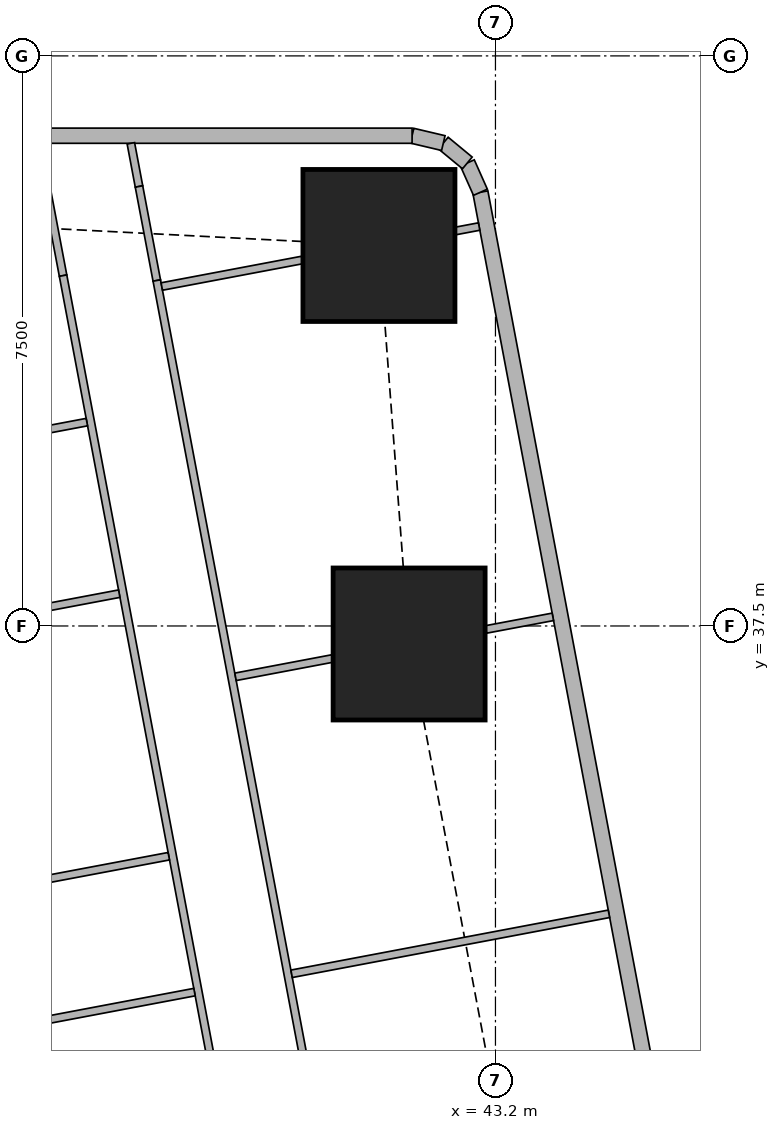
"""IFC4 building model, lengths in metres.
Left out: names, types, materials, properties, quantities, classifications, styles, units other than length and angle.
Written with IfcOpenShell. Run it as: python <this file> out.ifc"""

import sys

from ifc_helpers import new_model, si_unit, direction, frame, frame_2d, origin, origin_2d, place, context, subcontext, project, spatial, rectangle, extrude, element, fill, save


model = new_model("IFC4")
c1 = context("Model", 3, precision=1e-05, world=origin(), true_north=direction((0.0, 1.0)))
c2 = subcontext(c1, "Body", "Model", "MODEL_VIEW")
j1 = project(units=[si_unit("LENGTHUNIT", "METRE"), si_unit("PLANEANGLEUNIT", "RADIAN")], contexts=[c1])
p1 = place(None, origin())
s1 = spatial("IfcSite", under=j1, at=p1, CompositionType="ELEMENT")
p2 = place(p1, origin())
s2 = spatial("IfcBuilding", under=s1, at=p2, CompositionType="ELEMENT")
p3 = place(p2, frame((0.0, 0.0, 262.85)))
s3 = spatial("IfcBuildingStorey", under=s2, at=p3, CompositionType="ELEMENT", Elevation=262.85)
for number, where, z_axis, x_axis in (
    (1, (42.064, 37.263, 0.0), (0.0, 0.0, 1.0), (1.0, 0.0, 0.0)),
    (2, (41.667, 42.506, 0.0), (0.0, 0.0, 1.0), (1.0, 0.0, 0.0)),
):
    element("IfcColumn", number, at=place(p3, frame(where, z_axis=z_axis, x_axis=x_axis)), inside=s3, PredefinedType="COLUMN", context=c2, shape_type="SweptSolid", body=[
        extrude(rectangle(XDim=2.0, YDim=2.0, at=origin_2d()), origin(), (0.0, 0.0, 1.0), 3.75),
    ])
p4 = place(p3, frame((49.684, 7.832, 0.0), z_axis=(0.0, 0.0, 1.0), x_axis=(-0.185616669694, 0.982622232565, 0.0)))
e3 = element("IfcWall", 3, at=p4, inside=s3, PredefinedType="SOLIDWALL", context=c2, shape_type="SweptSolid", body=[
    extrude(rectangle(XDim=36.0, YDim=0.2, at=frame_2d((18.0, 0.0))), origin(), (0.0, 0.0, 1.0), 3.5),
])
p5 = place(p4, frame((2.518, 0.0, 0.9)))
e4 = element("IfcOpeningElement", 4, at=p5, cuts=e3, PredefinedType="OPENING", context=c2, shape_type="SweptSolid", body=[
    extrude(rectangle(XDim=2.4, YDim=1.5, at=frame_2d((1.2, 0.75))), frame((0.0, 0.11, 0.0), z_axis=(0.0, -1.0, 0.0), x_axis=(1.0, 0.0, 0.0)), (0.0, 0.0, 1.0), 0.22),
])
p6 = place(p4, frame((8.444, 0.0, 0.9)))
e5 = element("IfcOpeningElement", 5, at=p6, cuts=e3, PredefinedType="OPENING", context=c2, shape_type="SweptSolid", body=[
    extrude(rectangle(XDim=1.8, YDim=1.5, at=frame_2d((0.9, 0.75))), frame((0.0, 0.11, 0.0), z_axis=(0.0, -1.0, 0.0), x_axis=(1.0, 0.0, 0.0)), (0.0, 0.0, 1.0), 0.22),
])
p7 = place(p4, frame((12.261, 0.0, 0.9)))
e6 = element("IfcOpeningElement", 6, at=p7, cuts=e3, PredefinedType="OPENING", context=c2, shape_type="SweptSolid", body=[
    extrude(rectangle(XDim=1.8, YDim=1.5, at=frame_2d((0.9, 0.75))), frame((0.0, 0.11, 0.0), z_axis=(0.0, -1.0, 0.0), x_axis=(1.0, 0.0, 0.0)), (0.0, 0.0, 1.0), 0.22),
])
p8 = place(p4, frame((16.078, 0.0, 0.9)))
e7 = element("IfcOpeningElement", 7, at=p8, cuts=e3, PredefinedType="OPENING", context=c2, shape_type="SweptSolid", body=[
    extrude(rectangle(XDim=1.8, YDim=1.5, at=frame_2d((0.9, 0.75))), frame((0.0, 0.11, 0.0), z_axis=(0.0, -1.0, 0.0), x_axis=(1.0, 0.0, 0.0)), (0.0, 0.0, 1.0), 0.22),
])
p9 = place(p4, frame((19.894, 0.0, 0.9)))
e8 = element("IfcOpeningElement", 8, at=p9, cuts=e3, PredefinedType="OPENING", context=c2, shape_type="SweptSolid", body=[
    extrude(rectangle(XDim=1.8, YDim=1.5, at=frame_2d((0.9, 0.75))), frame((0.0, 0.11, 0.0), z_axis=(0.0, -1.0, 0.0), x_axis=(1.0, 0.0, 0.0)), (0.0, 0.0, 1.0), 0.22),
])
p10 = place(p4, frame((23.71, 0.0, 0.9)))
e9 = element("IfcOpeningElement", 9, at=p10, cuts=e3, PredefinedType="OPENING", context=c2, shape_type="SweptSolid", body=[
    extrude(rectangle(XDim=1.8, YDim=1.5, at=frame_2d((0.9, 0.75))), frame((0.0, 0.11, 0.0), z_axis=(0.0, -1.0, 0.0), x_axis=(1.0, 0.0, 0.0)), (0.0, 0.0, 1.0), 0.22),
])
p11 = place(p4, frame((27.526, 0.0, 0.9)))
e10 = element("IfcOpeningElement", 10, at=p11, cuts=e3, PredefinedType="OPENING", context=c2, shape_type="SweptSolid", body=[
    extrude(rectangle(XDim=1.8, YDim=1.5, at=frame_2d((0.9, 0.75))), frame((0.0, 0.11, 0.0), z_axis=(0.0, -1.0, 0.0), x_axis=(1.0, 0.0, 0.0)), (0.0, 0.0, 1.0), 0.22),
])
p12 = place(p4, frame((32.046, 0.0, 0.9)))
e11 = element("IfcOpeningElement", 11, at=p12, cuts=e3, PredefinedType="OPENING", context=c2, shape_type="SweptSolid", body=[
    extrude(rectangle(XDim=1.8, YDim=1.5, at=frame_2d((0.9, 0.75))), frame((0.0, 0.11, 0.0), z_axis=(0.0, -1.0, 0.0), x_axis=(1.0, 0.0, 0.0)), (0.0, 0.0, 1.0), 0.22),
])
p13 = place(p3, frame((43.002, 43.206, 0.0), z_axis=(0.0, 0.0, 1.0), x_axis=(-0.40678170573, 0.913525393124, 0.0)))
e12 = element("IfcWall", 12, at=p13, inside=s3, PredefinedType="SOLIDWALL", context=c2, shape_type="SweptSolid", body=[
    extrude(rectangle(XDim=0.423, YDim=0.2, at=frame_2d((0.211, 0.0))), origin(), (0.0, 0.0, 1.0), 3.5),
])
p14 = place(p3, frame((42.83, 43.592, 0.0), z_axis=(0.0, 0.0, 1.0), x_axis=(-0.771190539797, 0.636604391539, 0.0)))
e13 = element("IfcWall", 13, at=p14, inside=s3, PredefinedType="SOLIDWALL", context=c2, shape_type="SweptSolid", body=[
    extrude(rectangle(XDim=0.41, YDim=0.2, at=frame_2d((0.205, 0.0))), origin(), (0.0, 0.0, 1.0), 3.5),
])
p15 = place(p3, frame((42.514, 43.853, 0.0), z_axis=(0.0, 0.0, 1.0), x_axis=(-0.973288080424, 0.229587265555, 0.0)))
e14 = element("IfcWall", 14, at=p15, inside=s3, PredefinedType="SOLIDWALL", context=c2, shape_type="SweptSolid", body=[
    extrude(rectangle(XDim=0.422, YDim=0.2, at=frame_2d((0.211, 0.0))), origin(), (0.0, 0.0, 1.0), 3.5),
])
p16 = place(p3, frame((42.103, 43.95, 0.0), z_axis=(0.0, 0.0, 1.0), x_axis=(-1.0, 0.0, 0.0)))
e15 = element("IfcWall", 15, at=p16, inside=s3, PredefinedType="SOLIDWALL", context=c2, shape_type="SweptSolid", body=[
    extrude(rectangle(XDim=27.54, YDim=0.2, at=frame_2d((13.77, 0.0))), origin(), (0.0, 0.0, 1.0), 3.5),
])
p17 = place(p16, frame((10.603, 0.0, 0.9)))
e16 = element("IfcOpeningElement", 16, at=p17, cuts=e15, PredefinedType="OPENING", context=c2, shape_type="SweptSolid", body=[
    extrude(rectangle(XDim=1.8, YDim=1.5, at=frame_2d((0.9, 0.75))), frame((0.0, 0.11, 0.0), z_axis=(0.0, -1.0, 0.0), x_axis=(1.0, 0.0, 0.0)), (0.0, 0.0, 1.0), 0.22),
])
p18 = place(p16, frame((14.203, 0.0, 0.9)))
e17 = element("IfcOpeningElement", 17, at=p18, cuts=e15, PredefinedType="OPENING", context=c2, shape_type="SweptSolid", body=[
    extrude(rectangle(XDim=1.8, YDim=1.5, at=frame_2d((0.9, 0.75))), frame((0.0, 0.11, 0.0), z_axis=(0.0, -1.0, 0.0), x_axis=(1.0, 0.0, 0.0)), (0.0, 0.0, 1.0), 0.22),
])
p19 = place(p16, frame((17.803, 0.0, 0.9)))
e18 = element("IfcOpeningElement", 18, at=p19, cuts=e15, PredefinedType="OPENING", context=c2, shape_type="SweptSolid", body=[
    extrude(rectangle(XDim=1.8, YDim=1.5, at=frame_2d((0.9, 0.75))), frame((0.0, 0.11, 0.0), z_axis=(0.0, -1.0, 0.0), x_axis=(1.0, 0.0, 0.0)), (0.0, 0.0, 1.0), 0.22),
])
p20 = place(p16, frame((22.822, 0.0, 0.9)))
e19 = element("IfcOpeningElement", 19, at=p20, cuts=e15, PredefinedType="OPENING", context=c2, shape_type="SweptSolid", body=[
    extrude(rectangle(XDim=2.4, YDim=1.5, at=frame_2d((1.2, 0.75))), frame((0.0, 0.11, 0.0), z_axis=(0.0, -1.0, 0.0), x_axis=(1.0, 0.0, 0.0)), (0.0, 0.0, 1.0), 0.22),
])
p21 = place(p3, frame((34.036, 42.186, 0.0), z_axis=(0.0, 0.0, 1.0), x_axis=(0.185593518645, -0.9826266055, 0.0)))
e20 = element("IfcWall", 20, at=p21, inside=s3, PredefinedType="SOLIDWALL", context=c2, shape_type="SweptSolid", body=[
    extrude(rectangle(XDim=35.961, YDim=0.15, at=frame_2d((17.98, 0.0))), origin(), (0.0, 0.0, 1.0), 2.5),
])
p22 = place(p21, frame((15.529, 0.0, 0.0)))
e21 = element("IfcOpeningElement", 21, at=p22, cuts=e20, PredefinedType="OPENING", context=c2, shape_type="SweptSolid", body=[
    extrude(rectangle(XDim=1.0, YDim=2.1, at=frame_2d((0.5, 1.05))), frame((0.0, 0.085, 0.0), z_axis=(0.0, -1.0, 0.0), x_axis=(1.0, 0.0, 0.0)), (0.0, 0.0, 1.0), 0.17),
])
p23 = place(p21, frame((19.345, 0.0, 0.0)))
e22 = element("IfcOpeningElement", 22, at=p23, cuts=e20, PredefinedType="OPENING", context=c2, shape_type="SweptSolid", body=[
    extrude(rectangle(XDim=1.0, YDim=2.1, at=frame_2d((0.5, 1.05))), frame((0.0, 0.085, 0.0), z_axis=(0.0, -1.0, 0.0), x_axis=(1.0, 0.0, 0.0)), (0.0, 0.0, 1.0), 0.17),
])
p24 = place(p21, frame((30.594, 0.0, 0.0)))
e23 = element("IfcOpeningElement", 23, at=p24, cuts=e20, PredefinedType="OPENING", context=c2, shape_type="SweptSolid", body=[
    extrude(rectangle(XDim=1.0, YDim=2.1, at=frame_2d((0.5, 1.05))), frame((0.0, 0.085, 0.0), z_axis=(0.0, -1.0, 0.0), x_axis=(1.0, 0.0, 0.0)), (0.0, 0.0, 1.0), 0.17),
])
p25 = place(p3, frame((38.403, 43.85, 0.0), z_axis=(0.0, 0.0, 1.0), x_axis=(0.184976954078, -0.982742858768, 0.0)))
e24 = element("IfcWall", 24, at=p25, inside=s3, PredefinedType="PARTITIONING", context=c2, shape_type="SweptSolid", body=[
    extrude(rectangle(XDim=0.578, YDim=0.1, at=frame_2d((0.289, 0.0))), origin(), (0.0, 0.0, 1.0), 3.5),
])
p26 = place(p3, frame((38.51, 43.282, 0.0), z_axis=(0.0, 0.0, 1.0), x_axis=(0.185775287495, -0.982592256511, 0.0)))
e25 = element("IfcWall", 25, at=p26, inside=s3, PredefinedType="PARTITIONING", context=c2, shape_type="SweptSolid", body=[
    extrude(rectangle(XDim=1.259, YDim=0.1, at=frame_2d((0.629, 0.0))), origin(), (0.0, 0.0, 1.0), 2.05),
])
p27 = place(p26, frame((0.15, 0.0, 0.0)))
e26 = element("IfcOpeningElement", 26, at=p27, cuts=e25, PredefinedType="OPENING", context=c2, shape_type="SweptSolid", body=[
    extrude(rectangle(XDim=0.9, YDim=2.0, at=frame_2d((0.45, 1.0))), frame((0.0, 0.06, 0.0), z_axis=(0.0, -1.0, 0.0), x_axis=(1.0, 0.0, 0.0)), (0.0, 0.0, 1.0), 0.12),
])
p28 = place(p3, frame((38.744, 42.045, 0.0), z_axis=(0.0, 0.0, 1.0), x_axis=(0.185614085367, -0.982622720739, 0.0)))
e27 = element("IfcWall", 27, at=p28, inside=s3, PredefinedType="PARTITIONING", context=c2, shape_type="SweptSolid", body=[
    extrude(rectangle(XDim=12.898, YDim=0.1, at=frame_2d((6.449, 0.0))), origin(), (0.0, 0.0, 1.0), 2.5),
])
p29 = place(p28, frame((11.848, 0.0, 0.0)))
e28 = element("IfcOpeningElement", 28, at=p29, cuts=e27, PredefinedType="OPENING", context=c2, shape_type="SweptSolid", body=[
    extrude(rectangle(XDim=0.9, YDim=2.1, at=frame_2d((0.45, 1.05))), frame((0.0, 0.06, 0.0), z_axis=(0.0, -1.0, 0.0), x_axis=(1.0, 0.0, 0.0)), (0.0, 0.0, 1.0), 0.12),
])
p30 = place(p28, frame((8.191, 0.0, 0.0)))
e29 = element("IfcOpeningElement", 29, at=p30, cuts=e27, PredefinedType="OPENING", context=c2, shape_type="SweptSolid", body=[
    extrude(rectangle(XDim=0.9, YDim=2.1, at=frame_2d((0.45, 1.05))), frame((0.0, 0.06, 0.0), z_axis=(0.0, -1.0, 0.0), x_axis=(1.0, 0.0, 0.0)), (0.0, 0.0, 1.0), 0.12),
])
p31 = place(p28, frame((4.215, 0.0, 0.0)))
e30 = element("IfcOpeningElement", 30, at=p31, cuts=e27, PredefinedType="OPENING", context=c2, shape_type="SweptSolid", body=[
    extrude(rectangle(XDim=0.9, YDim=2.1, at=frame_2d((0.45, 1.05))), frame((0.0, 0.06, 0.0), z_axis=(0.0, -1.0, 0.0), x_axis=(1.0, 0.0, 0.0)), (0.0, 0.0, 1.0), 0.12),
])
p32 = place(p3, frame((37.277, 43.346, 0.0), z_axis=(0.0, 0.0, 1.0), x_axis=(0.185775287495, -0.982592256511, 0.0)))
e31 = element("IfcWall", 31, at=p32, inside=s3, PredefinedType="PARTITIONING", context=c2, shape_type="SweptSolid", body=[
    extrude(rectangle(XDim=1.259, YDim=0.1, at=frame_2d((0.629, 0.0))), origin(), (0.0, 0.0, 1.0), 2.05),
])
p33 = place(p3, frame((37.511, 42.109, 0.0), z_axis=(0.0, 0.0, 1.0), x_axis=(0.185550464988, -0.982634736279, 0.0)))
e32 = element("IfcWall", 32, at=p33, inside=s3, PredefinedType="PARTITIONING", context=c2, shape_type="SweptSolid", body=[
    extrude(rectangle(XDim=13.35, YDim=0.1, at=frame_2d((6.675, 0.0))), origin(), (0.0, 0.0, 1.0), 2.5),
])
p34 = place(p33, frame((11.845, 0.0, 0.0)))
e33 = element("IfcOpeningElement", 33, at=p34, cuts=e32, PredefinedType="OPENING", context=c2, shape_type="SweptSolid", body=[
    extrude(rectangle(XDim=0.9, YDim=2.1, at=frame_2d((0.45, 1.05))), frame((0.0, 0.06, 0.0), z_axis=(0.0, -1.0, 0.0), x_axis=(1.0, 0.0, 0.0)), (0.0, 0.0, 1.0), 0.12),
])
p35 = place(p33, frame((8.224, 0.0, 0.0)))
e34 = element("IfcOpeningElement", 34, at=p35, cuts=e32, PredefinedType="OPENING", context=c2, shape_type="SweptSolid", body=[
    extrude(rectangle(XDim=0.9, YDim=2.1, at=frame_2d((0.45, 1.05))), frame((0.0, 0.06, 0.0), z_axis=(0.0, -1.0, 0.0), x_axis=(1.0, 0.0, 0.0)), (0.0, 0.0, 1.0), 0.12),
])
p36 = place(p33, frame((2.65, 0.0, 0.0)))
e35 = element("IfcOpeningElement", 35, at=p36, cuts=e32, PredefinedType="OPENING", context=c2, shape_type="SweptSolid", body=[
    extrude(rectangle(XDim=0.9, YDim=2.1, at=frame_2d((0.45, 1.05))), frame((0.0, 0.06, 0.0), z_axis=(0.0, -1.0, 0.0), x_axis=(1.0, 0.0, 0.0)), (0.0, 0.0, 1.0), 0.12),
])
p37 = place(p33, frame((9.936, 0.0, 0.0)))
e36 = element("IfcOpeningElement", 36, at=p37, cuts=e32, PredefinedType="OPENING", context=c2, shape_type="SweptSolid", body=[
    extrude(rectangle(XDim=0.9, YDim=2.1, at=frame_2d((0.45, 1.05))), frame((0.0, 0.06, 0.0), z_axis=(0.0, -1.0, 0.0), x_axis=(1.0, 0.0, 0.0)), (0.0, 0.0, 1.0), 0.12),
])
p38 = place(p33, frame((5.555, 0.0, 0.0)))
e37 = element("IfcOpeningElement", 37, at=p38, cuts=e32, PredefinedType="OPENING", context=c2, shape_type="SweptSolid", body=[
    extrude(rectangle(XDim=0.9, YDim=2.1, at=frame_2d((0.45, 1.05))), frame((0.0, 0.06, 0.0), z_axis=(0.0, -1.0, 0.0), x_axis=(1.0, 0.0, 0.0)), (0.0, 0.0, 1.0), 0.12),
])
p39 = place(p3, frame((42.985, 42.755, 0.0), z_axis=(0.0, 0.0, 1.0), x_axis=(-0.98281924824, -0.184570651215, 0.0)))
e38 = element("IfcWall", 38, at=p39, inside=s3, PredefinedType="PARTITIONING", context=c2, shape_type="SweptSolid", body=[
    extrude(rectangle(XDim=0.313, YDim=0.1, at=frame_2d((0.157, 0.0))), origin(), (0.0, 0.0, 1.0), 3.5),
])
p40 = place(p3, frame((40.657, 42.315, 0.0), z_axis=(0.0, 0.0, 1.0), x_axis=(-0.982622785543, -0.185613742305, 0.0)))
e39 = element("IfcWall", 39, at=p40, inside=s3, PredefinedType="PARTITIONING", context=c2, shape_type="SweptSolid", body=[
    extrude(rectangle(XDim=1.88, YDim=0.1, at=frame_2d((0.94, 0.0))), origin(), (0.0, 0.0, 1.0), 2.05),
])
p41 = place(p3, frame((43.955, 37.62, 0.0), z_axis=(0.0, 0.0, 1.0), x_axis=(-0.982708424405, -0.18515980288, 0.0)))
e40 = element("IfcWall", 40, at=p41, inside=s3, PredefinedType="PARTITIONING", context=c2, shape_type="SweptSolid", body=[
    extrude(rectangle(XDim=0.897, YDim=0.1, at=frame_2d((0.448, 0.0))), origin(), (0.0, 0.0, 1.0), 3.5),
])
p42 = place(p3, frame((41.054, 37.072, 0.0), z_axis=(0.0, 0.0, 1.0), x_axis=(-0.982576752117, -0.185857273733, 0.0)))
e41 = element("IfcWall", 41, at=p42, inside=s3, PredefinedType="PARTITIONING", context=c2, shape_type="SweptSolid", body=[
    extrude(rectangle(XDim=1.297, YDim=0.1, at=frame_2d((0.648, 0.0))), origin(), (0.0, 0.0, 1.0), 3.5),
])
p43 = place(p3, frame((44.693, 33.713, 0.0), z_axis=(0.0, 0.0, 1.0), x_axis=(-0.982615600536, -0.185651775062, 0.0)))
e42 = element("IfcWall", 42, at=p43, inside=s3, PredefinedType="PARTITIONING", context=c2, shape_type="SweptSolid", body=[
    extrude(rectangle(XDim=4.249, YDim=0.1, at=frame_2d((2.125, 0.0))), origin(), (0.0, 0.0, 1.0), 2.5),
])
p44 = place(p3, frame((37.824, 40.182, 0.0), z_axis=(0.0, 0.0, 1.0), x_axis=(-0.982674977865, -0.185337227447, 0.0)))
e43 = element("IfcWall", 43, at=p44, inside=s3, PredefinedType="PARTITIONING", context=c2, shape_type="SweptSolid", body=[
    extrude(rectangle(XDim=3.275, YDim=0.1, at=frame_2d((1.637, 0.0))), origin(), (0.0, 0.0, 1.0), 3.5),
])
p45 = place(p3, frame((38.25, 37.925, 0.0), z_axis=(0.0, 0.0, 1.0), x_axis=(-0.982610209589, -0.185680305934, 0.0)))
e44 = element("IfcWall", 44, at=p45, inside=s3, PredefinedType="PARTITIONING", context=c2, shape_type="SweptSolid", body=[
    extrude(rectangle(XDim=1.567, YDim=0.1, at=frame_2d((0.784, 0.0))), origin(), (0.0, 0.0, 1.0), 3.5),
])
p46 = place(p3, frame((39.24, 32.683, 0.0), z_axis=(0.0, 0.0, 1.0), x_axis=(-0.982607026909, -0.185697147715, 0.0)))
e45 = element("IfcWall", 45, at=p46, inside=s3, PredefinedType="PARTITIONING", context=c2, shape_type="SweptSolid", body=[
    extrude(rectangle(XDim=3.275, YDim=0.1, at=frame_2d((1.637, 0.0))), origin(), (0.0, 0.0, 1.0), 3.5),
])
p47 = place(p3, frame((38.902, 34.471, 0.0), z_axis=(0.0, 0.0, 1.0), x_axis=(-0.982674977865, -0.185337227447, 0.0)))
e46 = element("IfcWall", 46, at=p47, inside=s3, PredefinedType="PARTITIONING", context=c2, shape_type="SweptSolid", body=[
    extrude(rectangle(XDim=3.275, YDim=0.1, at=frame_2d((1.637, 0.0))), origin(), (0.0, 0.0, 1.0), 3.5),
])
p48 = place(p3, frame((38.202, 10.163, 0.0), z_axis=(0.0, 0.0, 1.0), x_axis=(-0.185610321132, 0.982623431783, 0.0)))
e47 = element("IfcWall", 47, at=p48, inside=s3, PredefinedType="PARTITIONING", context=c2, shape_type="SweptSolid", body=[
    extrude(rectangle(XDim=25.111, YDim=0.125, at=frame_2d((12.556, 0.0))), origin(), (0.0, 0.0, 1.0), 2.5),
])
p49 = place(p48, frame((0.708, 0.0, 0.0)))
e48 = element("IfcOpeningElement", 48, at=p49, cuts=e47, PredefinedType="OPENING", context=c2, shape_type="SweptSolid", body=[
    extrude(rectangle(XDim=1.0, YDim=2.1, at=frame_2d((0.5, 1.05))), frame((0.0, 0.073, 0.0), z_axis=(0.0, -1.0, 0.0), x_axis=(1.0, 0.0, 0.0)), (0.0, 0.0, 1.0), 0.145),
])
p50 = place(p48, frame((5.9, 0.0, 0.0)))
e49 = element("IfcOpeningElement", 49, at=p50, cuts=e47, PredefinedType="OPENING", context=c2, shape_type="SweptSolid", body=[
    extrude(rectangle(XDim=1.0, YDim=2.1, at=frame_2d((0.5, 1.05))), frame((0.0, 0.073, 0.0), z_axis=(0.0, -1.0, 0.0), x_axis=(1.0, 0.0, 0.0)), (0.0, 0.0, 1.0), 0.145),
])
p51 = place(p48, frame((13.378, 0.0, 0.0)))
e50 = element("IfcOpeningElement", 50, at=p51, cuts=e47, PredefinedType="OPENING", context=c2, shape_type="SweptSolid", body=[
    extrude(rectangle(XDim=1.0, YDim=2.1, at=frame_2d((0.5, 1.05))), frame((0.0, 0.073, 0.0), z_axis=(0.0, -1.0, 0.0), x_axis=(1.0, 0.0, 0.0)), (0.0, 0.0, 1.0), 0.145),
])
p52 = place(p48, frame((17.194, 0.0, 0.0)))
e51 = element("IfcOpeningElement", 51, at=p52, cuts=e47, PredefinedType="OPENING", context=c2, shape_type="SweptSolid", body=[
    extrude(rectangle(XDim=1.0, YDim=2.1, at=frame_2d((0.5, 1.05))), frame((0.0, 0.073, 0.0), z_axis=(0.0, -1.0, 0.0), x_axis=(1.0, 0.0, 0.0)), (0.0, 0.0, 1.0), 0.145),
])
p53 = place(p48, frame((21.15, 0.0, 0.0)))
e52 = element("IfcOpeningElement", 52, at=p53, cuts=e47, PredefinedType="OPENING", context=c2, shape_type="SweptSolid", body=[
    extrude(rectangle(XDim=1.0, YDim=2.1, at=frame_2d((0.5, 1.05))), frame((0.0, 0.073, 0.0), z_axis=(0.0, -1.0, 0.0), x_axis=(1.0, 0.0, 0.0)), (0.0, 0.0, 1.0), 0.145),
])
p54 = place(p10, origin())
e53 = element("IfcWindow", 53, at=p54, inside=s3, PartitioningType="SINGLE_PANEL", PredefinedType="WINDOW", context=c2, shape_type="SweptSolid", body=[
    extrude(rectangle(XDim=1.8, YDim=1.5, at=frame_2d((0.9, 0.75))), frame((0.0, 0.03, 0.0), z_axis=(0.0, -1.0, 0.0), x_axis=(1.0, 0.0, 0.0)), (0.0, 0.0, 1.0), 0.06),
])
fill(e9, e53)
p55 = place(p11, origin())
e54 = element("IfcWindow", 54, at=p55, inside=s3, PartitioningType="SINGLE_PANEL", PredefinedType="WINDOW", context=c2, shape_type="SweptSolid", body=[
    extrude(rectangle(XDim=1.8, YDim=1.5, at=frame_2d((0.9, 0.75))), frame((0.0, 0.03, 0.0), z_axis=(0.0, -1.0, 0.0), x_axis=(1.0, 0.0, 0.0)), (0.0, 0.0, 1.0), 0.06),
])
fill(e10, e54)
p56 = place(p12, origin())
e55 = element("IfcWindow", 55, at=p56, inside=s3, PartitioningType="SINGLE_PANEL", PredefinedType="WINDOW", context=c2, shape_type="SweptSolid", body=[
    extrude(rectangle(XDim=1.8, YDim=1.5, at=frame_2d((0.9, 0.75))), frame((0.0, 0.03, 0.0), z_axis=(0.0, -1.0, 0.0), x_axis=(1.0, 0.0, 0.0)), (0.0, 0.0, 1.0), 0.06),
])
fill(e11, e55)
p57 = place(p27, origin())
e56 = element("IfcDoor", 56, at=p57, inside=s3, OperationType="SINGLE_SWING_LEFT", PredefinedType="DOOR", context=c2, shape_type="SweptSolid", body=[
    extrude(rectangle(XDim=0.9, YDim=2.0, at=frame_2d((0.45, 1.0))), frame((0.0, 0.025, 0.0), z_axis=(0.0, -1.0, 0.0), x_axis=(1.0, 0.0, 0.0)), (0.0, 0.0, 1.0), 0.05),
])
fill(e26, e56)
p58 = place(p30, origin())
e57 = element("IfcDoor", 57, at=p58, inside=s3, OperationType="SINGLE_SWING_RIGHT", PredefinedType="DOOR", context=c2, shape_type="SweptSolid", body=[
    extrude(rectangle(XDim=0.9, YDim=2.1, at=frame_2d((0.45, 1.05))), frame((0.0, 0.025, 0.0), z_axis=(0.0, -1.0, 0.0), x_axis=(1.0, 0.0, 0.0)), (0.0, 0.0, 1.0), 0.05),
])
fill(e29, e57)
p59 = place(p31, origin())
e58 = element("IfcDoor", 58, at=p59, inside=s3, OperationType="SINGLE_SWING_RIGHT", PredefinedType="DOOR", context=c2, shape_type="SweptSolid", body=[
    extrude(rectangle(XDim=0.9, YDim=2.1, at=frame_2d((0.45, 1.05))), frame((0.0, 0.025, 0.0), z_axis=(0.0, -1.0, 0.0), x_axis=(1.0, 0.0, 0.0)), (0.0, 0.0, 1.0), 0.05),
])
fill(e30, e58)
p60 = place(p35, origin())
e59 = element("IfcDoor", 59, at=p60, inside=s3, OperationType="SINGLE_SWING_RIGHT", PredefinedType="DOOR", context=c2, shape_type="SweptSolid", body=[
    extrude(rectangle(XDim=0.9, YDim=2.1, at=frame_2d((0.45, 1.05))), frame((0.0, 0.025, 0.0), z_axis=(0.0, -1.0, 0.0), x_axis=(1.0, 0.0, 0.0)), (0.0, 0.0, 1.0), 0.05),
])
fill(e34, e59)
p61 = place(p36, origin())
e60 = element("IfcDoor", 60, at=p61, inside=s3, OperationType="SINGLE_SWING_RIGHT", PredefinedType="DOOR", context=c2, shape_type="SweptSolid", body=[
    extrude(rectangle(XDim=0.9, YDim=2.1, at=frame_2d((0.45, 1.05))), frame((0.0, 0.025, 0.0), z_axis=(0.0, -1.0, 0.0), x_axis=(1.0, 0.0, 0.0)), (0.0, 0.0, 1.0), 0.05),
])
fill(e35, e60)
p62 = place(p37, origin())
e61 = element("IfcDoor", 61, at=p62, inside=s3, OperationType="SINGLE_SWING_LEFT", PredefinedType="DOOR", context=c2, shape_type="SweptSolid", body=[
    extrude(rectangle(XDim=0.9, YDim=2.1, at=frame_2d((0.45, 1.05))), frame((0.0, 0.025, 0.0), z_axis=(0.0, -1.0, 0.0), x_axis=(1.0, 0.0, 0.0)), (0.0, 0.0, 1.0), 0.05),
])
fill(e36, e61)
p63 = place(p38, origin())
e62 = element("IfcDoor", 62, at=p63, inside=s3, OperationType="SINGLE_SWING_LEFT", PredefinedType="DOOR", context=c2, shape_type="SweptSolid", body=[
    extrude(rectangle(XDim=0.9, YDim=2.1, at=frame_2d((0.45, 1.05))), frame((0.0, 0.025, 0.0), z_axis=(0.0, -1.0, 0.0), x_axis=(1.0, 0.0, 0.0)), (0.0, 0.0, 1.0), 0.05),
])
fill(e37, e62)
save(model, sys.argv[1])
